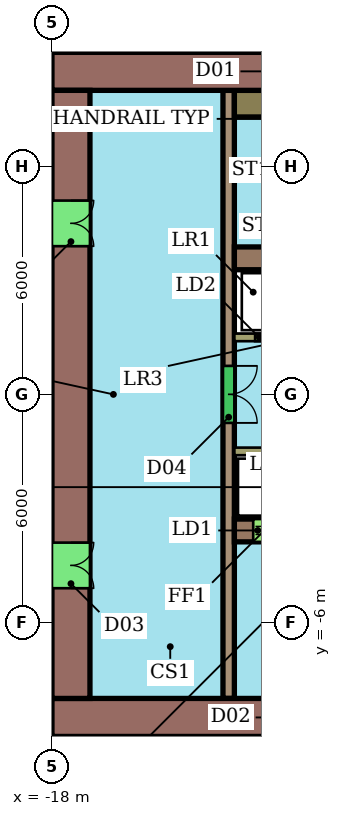
"""IFC4 building model, lengths in metres.
Left out: names, types, materials, properties, quantities, classifications, styles, units other than length and angle.
Written with IfcOpenShell. Run it as: python <this file> out.ifc"""

import sys

from ifc_helpers import new_model, si_unit, direction, frame, frame_2d, origin, place, context, subcontext, project, spatial, rectangle, extrude, element, fill, save


model = new_model("IFC4")
c1 = context("Model", 3, precision=1e-05, world=origin(), true_north=direction((0.0, 1.0)))
c2 = subcontext(c1, "Body", "Model", "MODEL_VIEW")
j1 = project(units=[si_unit("LENGTHUNIT", "METRE"), si_unit("PLANEANGLEUNIT", "RADIAN")], contexts=[c1])
p1 = place(None, origin())
s1 = spatial("IfcSite", under=j1, at=p1, CompositionType="ELEMENT")
p2 = place(p1, origin())
s2 = spatial("IfcBuilding", under=s1, at=p2, CompositionType="ELEMENT")
p3 = place(p2, frame((0.0, 0.0, 88.6)))
s3 = spatial("IfcBuildingStorey", under=s2, at=p3, CompositionType="ELEMENT", Elevation=88.6)
p4 = place(p3, frame((-6.0, 8.5, 0.0), z_axis=(0.0, 0.0, 1.0), x_axis=(-1.0, 0.0, 0.0)))
e1 = element("IfcWall", 1, at=p4, inside=s3, PredefinedType="SHEAR", context=c2, shape_type="SweptSolid", body=[
    extrude(rectangle(XDim=12.0, YDim=1.0, at=frame_2d((6.0, 0.0))), origin(), (0.0, 0.0, 1.0), 3.3),
])
p5 = place(p4, frame((5.2, 0.0, 0.0)))
e2 = element("IfcOpeningElement", 2, at=p5, cuts=e1, PredefinedType="OPENING", context=c2, shape_type="SweptSolid", body=[
    extrude(rectangle(XDim=1.2, YDim=2.1, at=frame_2d((0.6, 1.05))), frame((0.0, 0.51, 0.0), z_axis=(0.0, -1.0, 0.0), x_axis=(1.0, 0.0, 0.0)), (0.0, 0.0, 1.0), 1.02),
])
p6 = place(p3, frame((-18.0, -8.5, 0.0), z_axis=(0.0, 0.0, 1.0), x_axis=(1.0, 0.0, 0.0)))
e3 = element("IfcWall", 3, at=p6, inside=s3, PredefinedType="SHEAR", context=c2, shape_type="SweptSolid", body=[
    extrude(rectangle(XDim=24.0, YDim=1.0, at=frame_2d((12.0, 0.0))), origin(), (0.0, 0.0, 1.0), 3.3),
])
p7 = place(p6, frame((6.0, 0.0, 0.0)))
e4 = element("IfcOpeningElement", 4, at=p7, cuts=e3, PredefinedType="OPENING", context=c2, shape_type="SweptSolid", body=[
    extrude(rectangle(XDim=1.2, YDim=2.1, at=frame_2d((0.6, 1.05))), frame((0.0, 0.51, 0.0), z_axis=(0.0, -1.0, 0.0), x_axis=(1.0, 0.0, 0.0)), (0.0, 0.0, 1.0), 1.02),
])
p8 = place(p3, frame((-17.5, 8.0, 0.0), z_axis=(0.0, 0.0, 1.0), x_axis=(0.0, -1.0, 0.0)))
e5 = element("IfcWall", 5, at=p8, inside=s3, PredefinedType="SHEAR", context=c2, shape_type="SweptSolid", body=[
    extrude(rectangle(XDim=16.0, YDim=1.0, at=frame_2d((8.0, 0.0))), origin(), (0.0, 0.0, 1.0), 3.3),
])
p9 = place(p8, frame((11.9, 0.0, 0.0)))
e6 = element("IfcOpeningElement", 6, at=p9, cuts=e5, PredefinedType="OPENING", context=c2, shape_type="SweptSolid", body=[
    extrude(rectangle(XDim=1.2, YDim=2.1, at=frame_2d((0.6, 1.05))), frame((0.0, 0.51, 0.0), z_axis=(0.0, -1.0, 0.0), x_axis=(1.0, 0.0, 0.0)), (0.0, 0.0, 1.0), 1.02),
])
p10 = place(p8, frame((2.9, 0.0, 0.0)))
e7 = element("IfcOpeningElement", 7, at=p10, cuts=e5, PredefinedType="OPENING", context=c2, shape_type="SweptSolid", body=[
    extrude(rectangle(XDim=1.2, YDim=2.1, at=frame_2d((0.6, 1.05))), frame((0.0, 0.51, 0.0), z_axis=(0.0, -1.0, 0.0), x_axis=(1.0, 0.0, 0.0)), (0.0, 0.0, 1.0), 1.02),
])
p11 = place(p3, frame((-13.2, 3.58, 0.0), z_axis=(0.0, 0.0, 1.0), x_axis=(1.0, 0.0, 0.0)))
e8 = element("IfcWall", 8, at=p11, inside=s3, PredefinedType="SHEAR", context=c2, shape_type="SweptSolid", body=[
    extrude(rectangle(XDim=7.2, YDim=0.6, at=frame_2d((3.6, 0.0))), origin(), (0.0, 0.0, 1.0), 3.3),
])
p12 = place(p3, frame((-13.2, -3.58, 0.0), z_axis=(0.0, 0.0, 1.0), x_axis=(1.0, 0.0, 0.0)))
e9 = element("IfcWall", 9, at=p12, inside=s3, PredefinedType="SHEAR", context=c2, shape_type="SweptSolid", body=[
    extrude(rectangle(XDim=7.2, YDim=0.6, at=frame_2d((3.6, 0.0))), origin(), (0.0, 0.0, 1.0), 3.3),
])
p13 = place(p12, frame((0.496, 0.0, 0.0)))
e10 = element("IfcOpeningElement", 10, at=p13, cuts=e9, PredefinedType="OPENING", context=c2, shape_type="SweptSolid", body=[
    extrude(rectangle(XDim=1.2, YDim=2.1, at=frame_2d((0.6, 1.05))), frame((0.0, 0.31, 0.0), z_axis=(0.0, -1.0, 0.0), x_axis=(1.0, 0.0, 0.0)), (0.0, 0.0, 1.0), 0.62),
])
p14 = place(p12, frame((2.938, 0.0, 0.0)))
e11 = element("IfcOpeningElement", 11, at=p14, cuts=e9, PredefinedType="OPENING", context=c2, shape_type="SweptSolid", body=[
    extrude(rectangle(XDim=1.2, YDim=2.1, at=frame_2d((0.6, 1.05))), frame((0.0, 0.31, 0.0), z_axis=(0.0, -1.0, 0.0), x_axis=(1.0, 0.0, 0.0)), (0.0, 0.0, 1.0), 0.62),
])
p15 = place(p3, frame((-13.35, 8.0, 0.0), z_axis=(0.0, 0.0, 1.0), x_axis=(0.0, -1.0, 0.0)))
e12 = element("IfcWall", 12, at=p15, inside=s3, PredefinedType="SHEAR", context=c2, shape_type="SweptSolid", body=[
    extrude(rectangle(XDim=16.0, YDim=0.3, at=frame_2d((8.0, 0.0))), origin(), (0.0, 0.0, 1.0), 3.3),
])
p16 = place(p15, frame((7.25, 0.0, 0.0)))
e13 = element("IfcOpeningElement", 13, at=p16, cuts=e12, PredefinedType="OPENING", context=c2, shape_type="SweptSolid", body=[
    extrude(rectangle(XDim=1.5, YDim=2.1, at=frame_2d((0.75, 1.05))), frame((0.0, 0.16, 0.0), z_axis=(0.0, -1.0, 0.0), x_axis=(1.0, 0.0, 0.0)), (0.0, 0.0, 1.0), 0.32),
])
p17 = place(p3, frame((-13.2, 1.5, 0.0), z_axis=(0.0, 0.0, 1.0), x_axis=(1.0, 0.0, 0.0)))
e14 = element("IfcWall", 14, at=p17, inside=s3, PredefinedType="SHEAR", context=c2, shape_type="SweptSolid", body=[
    extrude(rectangle(XDim=14.4, YDim=0.2, at=frame_2d((7.2, 0.0))), origin(), (0.0, 0.0, 1.0), 3.3),
])
p18 = place(p17, frame((0.546, 0.0, 0.0)))
e15 = element("IfcOpeningElement", 15, at=p18, cuts=e14, PredefinedType="OPENING", context=c2, shape_type="SweptSolid", body=[
    extrude(rectangle(XDim=1.1, YDim=2.1, at=frame_2d((0.55, 1.05))), frame((0.0, 0.11, 0.0), z_axis=(0.0, -1.0, 0.0), x_axis=(1.0, 0.0, 0.0)), (0.0, 0.0, 1.0), 0.22),
])
p19 = place(p17, frame((2.988, 0.0, 0.0)))
e16 = element("IfcOpeningElement", 16, at=p19, cuts=e14, PredefinedType="OPENING", context=c2, shape_type="SweptSolid", body=[
    extrude(rectangle(XDim=1.1, YDim=2.1, at=frame_2d((0.55, 1.05))), frame((0.0, 0.11, 0.0), z_axis=(0.0, -1.0, 0.0), x_axis=(1.0, 0.0, 0.0)), (0.0, 0.0, 1.0), 0.22),
])
p20 = place(p17, frame((5.429, 0.0, 0.0)))
e17 = element("IfcOpeningElement", 17, at=p20, cuts=e14, PredefinedType="OPENING", context=c2, shape_type="SweptSolid", body=[
    extrude(rectangle(XDim=1.1, YDim=2.1, at=frame_2d((0.55, 1.05))), frame((0.0, 0.11, 0.0), z_axis=(0.0, -1.0, 0.0), x_axis=(1.0, 0.0, 0.0)), (0.0, 0.0, 1.0), 0.22),
])
p21 = place(p17, frame((7.871, 0.0, 0.0)))
e18 = element("IfcOpeningElement", 18, at=p21, cuts=e14, PredefinedType="OPENING", context=c2, shape_type="SweptSolid", body=[
    extrude(rectangle(XDim=1.1, YDim=2.1, at=frame_2d((0.55, 1.05))), frame((0.0, 0.11, 0.0), z_axis=(0.0, -1.0, 0.0), x_axis=(1.0, 0.0, 0.0)), (0.0, 0.0, 1.0), 0.22),
])
p22 = place(p17, frame((10.958, 0.0, 0.0)))
e19 = element("IfcOpeningElement", 19, at=p22, cuts=e14, PredefinedType="OPENING", context=c2, shape_type="SweptSolid", body=[
    extrude(rectangle(XDim=0.9, YDim=2.1, at=frame_2d((0.45, 1.05))), frame((0.0, 0.11, 0.0), z_axis=(0.0, -1.0, 0.0), x_axis=(1.0, 0.0, 0.0)), (0.0, 0.0, 1.0), 0.22),
])
p23 = place(p17, frame((13.35, 0.0, 0.0)))
e20 = element("IfcOpeningElement", 20, at=p23, cuts=e14, PredefinedType="OPENING", context=c2, shape_type="SweptSolid", body=[
    extrude(rectangle(XDim=0.9, YDim=2.1, at=frame_2d((0.45, 1.05))), frame((0.0, 0.11, 0.0), z_axis=(0.0, -1.0, 0.0), x_axis=(1.0, 0.0, 0.0)), (0.0, 0.0, 1.0), 0.22),
])
p24 = place(p3, frame((1.2, -1.5, 0.0), z_axis=(0.0, 0.0, 1.0), x_axis=(-1.0, 0.0, 0.0)))
e21 = element("IfcWall", 21, at=p24, inside=s3, PredefinedType="SHEAR", context=c2, shape_type="SweptSolid", body=[
    extrude(rectangle(XDim=14.4, YDim=0.2, at=frame_2d((7.2, 0.0))), origin(), (0.0, 0.0, 1.0), 3.3),
])
p25 = place(p24, frame((7.821, 0.0, 0.0)))
e22 = element("IfcOpeningElement", 22, at=p25, cuts=e21, PredefinedType="OPENING", context=c2, shape_type="SweptSolid", body=[
    extrude(rectangle(XDim=1.2, YDim=2.1, at=frame_2d((0.6, 1.05))), frame((0.0, 0.11, 0.0), z_axis=(0.0, -1.0, 0.0), x_axis=(1.0, 0.0, 0.0)), (0.0, 0.0, 1.0), 0.22),
])
p26 = place(p24, frame((0.15, 0.0, 0.0)))
e23 = element("IfcOpeningElement", 23, at=p26, cuts=e21, PredefinedType="OPENING", context=c2, shape_type="SweptSolid", body=[
    extrude(rectangle(XDim=1.0, YDim=2.1, at=frame_2d((0.5, 1.05))), frame((0.0, 0.11, 0.0), z_axis=(0.0, -1.0, 0.0), x_axis=(1.0, 0.0, 0.0)), (0.0, 0.0, 1.0), 0.22),
])
p27 = place(p3, frame((-13.2, 7.65, 0.0), z_axis=(0.0, 0.0, 1.0), x_axis=(1.0, 0.0, 0.0)))
e24 = element("IfcWall", 24, at=p27, inside=s3, PredefinedType="SHEAR", context=c2, shape_type="SweptSolid", body=[
    extrude(rectangle(XDim=0.8, YDim=0.7, at=frame_2d((0.4, 0.0))), origin(), (0.0, 0.0, 1.0), 3.3),
])
p28 = place(p9, origin())
e25 = element("IfcDoor", 25, at=p28, inside=s3, OperationType="DOUBLE_DOOR_SINGLE_SWING", PredefinedType="NOTDEFINED", context=c2, shape_type="SweptSolid", body=[
    extrude(rectangle(XDim=1.2, YDim=2.1, at=frame_2d((0.6, 1.05))), frame((0.0, 0.025, 0.0), z_axis=(0.0, -1.0, 0.0), x_axis=(1.0, 0.0, 0.0)), (0.0, 0.0, 1.0), 0.05),
])
fill(e6, e25)
p29 = place(p10, origin())
e26 = element("IfcDoor", 26, at=p29, inside=s3, OperationType="DOUBLE_DOOR_SINGLE_SWING", PredefinedType="NOTDEFINED", context=c2, shape_type="SweptSolid", body=[
    extrude(rectangle(XDim=1.2, YDim=2.1, at=frame_2d((0.6, 1.05))), frame((0.0, 0.025, 0.0), z_axis=(0.0, -1.0, 0.0), x_axis=(1.0, 0.0, 0.0)), (0.0, 0.0, 1.0), 0.05),
])
fill(e7, e26)
p30 = place(p13, origin())
e27 = element("IfcDoor", 27, at=p30, inside=s3, OperationType="DOUBLE_DOOR_SLIDING", PredefinedType="NOTDEFINED", context=c2, shape_type="SweptSolid", body=[
    extrude(rectangle(XDim=1.2, YDim=2.1, at=frame_2d((0.6, 1.05))), frame((0.0, 0.025, 0.0), z_axis=(0.0, -1.0, 0.0), x_axis=(1.0, 0.0, 0.0)), (0.0, 0.0, 1.0), 0.05),
])
fill(e10, e27)
p31 = place(p16, origin())
e28 = element("IfcDoor", 28, at=p31, inside=s3, OperationType="DOUBLE_DOOR_SINGLE_SWING", PredefinedType="NOTDEFINED", context=c2, shape_type="SweptSolid", body=[
    extrude(rectangle(XDim=1.5, YDim=2.1, at=frame_2d((0.75, 1.05))), frame((0.0, 0.025, 0.0), z_axis=(0.0, -1.0, 0.0), x_axis=(1.0, 0.0, 0.0)), (0.0, 0.0, 1.0), 0.05),
])
fill(e13, e28)
p32 = place(p18, origin())
e29 = element("IfcDoor", 29, at=p32, inside=s3, OperationType="DOUBLE_DOOR_SLIDING", PredefinedType="NOTDEFINED", context=c2, shape_type="SweptSolid", body=[
    extrude(rectangle(XDim=1.1, YDim=2.1, at=frame_2d((0.55, 1.05))), frame((0.0, 0.025, 0.0), z_axis=(0.0, -1.0, 0.0), x_axis=(1.0, 0.0, 0.0)), (0.0, 0.0, 1.0), 0.05),
])
fill(e15, e29)
save(model, sys.argv[1])
